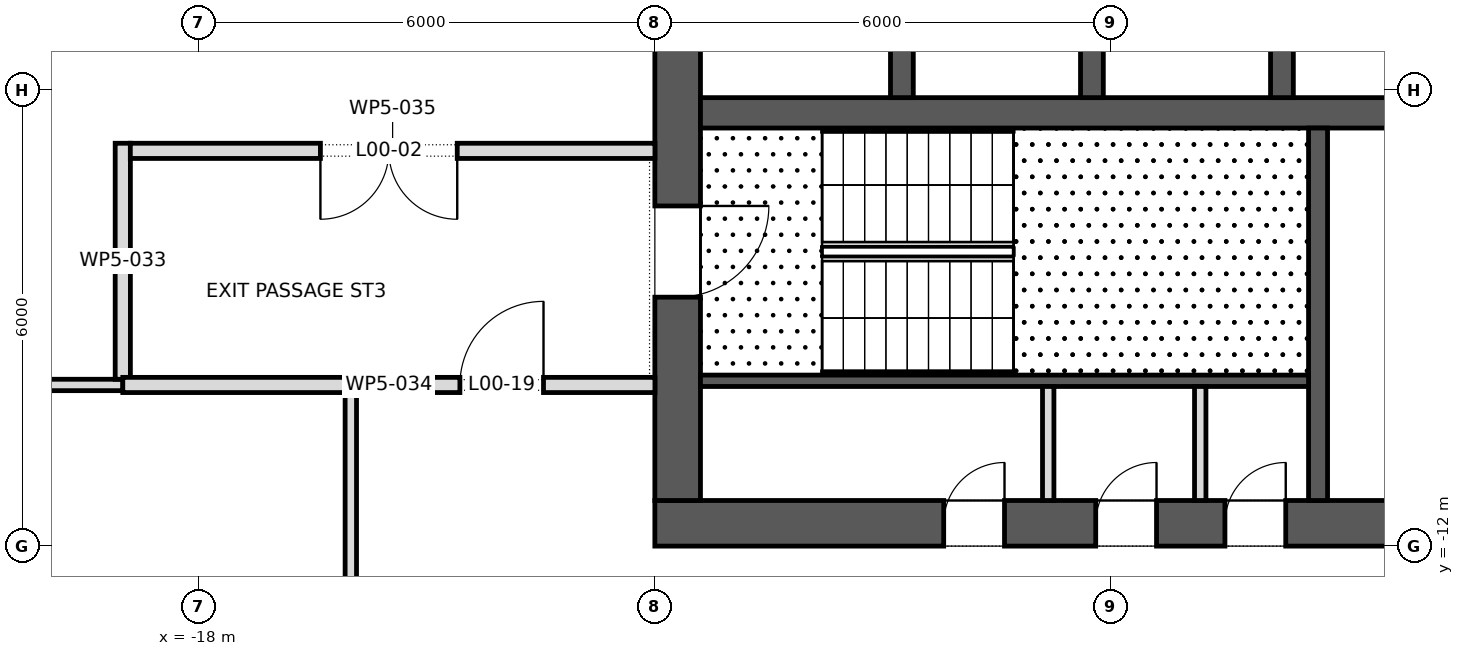
"""IFC4 building model, lengths in metres.
Left out: names, types, materials, properties, quantities, classifications, styles, units other than length and angle.
Written with IfcOpenShell. Run it as: python <this file> out.ifc"""

import sys

from ifc_helpers import new_model, si_unit, direction, frame, frame_2d, origin, place, context, subcontext, project, spatial, polyline, rectangle, outline, extrude, element, fill, save


model = new_model("IFC4")
c1 = context("Model", 3, precision=1e-05, world=origin(), true_north=direction((0.0, 1.0)))
c2 = subcontext(c1, "Body", "Model", "MODEL_VIEW")
j1 = project(units=[si_unit("LENGTHUNIT", "METRE"), si_unit("PLANEANGLEUNIT", "RADIAN")], contexts=[c1])
p1 = place(None, origin())
s1 = spatial("IfcSite", under=j1, at=p1, CompositionType="ELEMENT")
p2 = place(p1, origin())
s2 = spatial("IfcBuilding", under=s1, at=p2, CompositionType="ELEMENT")
p3 = place(p2, origin())
s3 = spatial("IfcBuildingStorey", under=s2, at=p3, CompositionType="ELEMENT", Elevation=0.0)
p4 = place(p3, frame((-12.0, -11.7, 0.0), z_axis=(0.0, 0.0, 1.0), x_axis=(1.0, 0.0, 0.0)))
e1 = element("IfcWall", 1, at=p4, inside=s3, PredefinedType="SHEAR", context=c2, shape_type="SweptSolid", body=[
    extrude(rectangle(XDim=24.0, YDim=0.6, at=frame_2d((12.0, 0.0))), origin(), (0.0, 0.0, 1.0), 7.0),
])
p5 = place(p4, frame((9.975, 0.0, 0.0)))
e2 = element("IfcOpeningElement", 2, at=p5, cuts=e1, PredefinedType="OPENING", context=c2, shape_type="SweptSolid", body=[
    extrude(rectangle(XDim=0.9, YDim=2.1, at=frame_2d((0.45, 1.05))), frame((0.0, 0.312, 0.0), z_axis=(0.0, -1.0, 0.0), x_axis=(1.0, 0.0, 0.0)), (0.0, 0.0, 1.0), 0.624),
])
p6 = place(p4, frame((3.8, 0.0, 0.0)))
e3 = element("IfcOpeningElement", 3, at=p6, cuts=e1, PredefinedType="OPENING", context=c2, shape_type="SweptSolid", body=[
    extrude(rectangle(XDim=0.8, YDim=2.1, at=frame_2d((0.4, 1.05))), frame((0.0, 0.312, 0.0), z_axis=(0.0, -1.0, 0.0), x_axis=(1.0, 0.0, 0.0)), (0.0, 0.0, 1.0), 0.624),
])
p7 = place(p4, frame((5.8, 0.0, 0.0)))
e4 = element("IfcOpeningElement", 4, at=p7, cuts=e1, PredefinedType="OPENING", context=c2, shape_type="SweptSolid", body=[
    extrude(rectangle(XDim=0.8, YDim=2.1, at=frame_2d((0.4, 1.05))), frame((0.0, 0.312, 0.0), z_axis=(0.0, -1.0, 0.0), x_axis=(1.0, 0.0, 0.0)), (0.0, 0.0, 1.0), 0.624),
])
p8 = place(p4, frame((7.5, 0.0, 0.0)))
e5 = element("IfcOpeningElement", 5, at=p8, cuts=e1, PredefinedType="OPENING", context=c2, shape_type="SweptSolid", body=[
    extrude(rectangle(XDim=0.8, YDim=2.1, at=frame_2d((0.4, 1.05))), frame((0.0, 0.312, 0.0), z_axis=(0.0, -1.0, 0.0), x_axis=(1.0, 0.0, 0.0)), (0.0, 0.0, 1.0), 0.624),
])
p9 = place(p4, frame((15.85, 0.0, 0.0)))
e6 = element("IfcOpeningElement", 6, at=p9, cuts=e1, PredefinedType="OPENING", context=c2, shape_type="SweptSolid", body=[
    extrude(rectangle(XDim=0.8, YDim=2.1, at=frame_2d((0.4, 1.05))), frame((0.0, 0.312, 0.0), z_axis=(0.0, -1.0, 0.0), x_axis=(1.0, 0.0, 0.0)), (0.0, 0.0, 1.0), 0.624),
])
p10 = place(p3, frame((-11.7, -11.4, 0.0), z_axis=(0.0, 0.0, 1.0), x_axis=(0.0, 1.0, 0.0)))
e7 = element("IfcWall", 7, at=p10, inside=s3, PredefinedType="SHEAR", context=c2, shape_type="SweptSolid", body=[
    extrude(rectangle(XDim=22.8, YDim=0.6, at=frame_2d((11.4, 0.0))), origin(), (0.0, 0.0, 1.0), 7.0),
])
p11 = place(p10, frame((10.2, 0.0, 0.0)))
e8 = element("IfcOpeningElement", 8, at=p11, cuts=e7, PredefinedType="OPENING", context=c2, shape_type="SweptSolid", body=[
    extrude(rectangle(XDim=2.4, YDim=2.1, at=frame_2d((1.2, 1.05))), frame((0.0, 0.312, 0.0), z_axis=(0.0, -1.0, 0.0), x_axis=(1.0, 0.0, 0.0)), (0.0, 0.0, 1.0), 0.624),
])
p12 = place(p10, frame((18.925, 0.0, 0.0)))
e9 = element("IfcOpeningElement", 9, at=p12, cuts=e7, PredefinedType="OPENING", context=c2, shape_type="SweptSolid", body=[
    extrude(rectangle(XDim=1.2, YDim=2.1, at=frame_2d((0.6, 1.05))), frame((0.0, 0.312, 0.0), z_axis=(0.0, -1.0, 0.0), x_axis=(1.0, 0.0, 0.0)), (0.0, 0.0, 1.0), 0.624),
])
p13 = place(p10, frame((2.675, 0.0, 0.0)))
e10 = element("IfcOpeningElement", 10, at=p13, cuts=e7, PredefinedType="OPENING", context=c2, shape_type="SweptSolid", body=[
    extrude(rectangle(XDim=1.2, YDim=2.1, at=frame_2d((0.6, 1.05))), frame((0.0, 0.312, 0.0), z_axis=(0.0, -1.0, 0.0), x_axis=(1.0, 0.0, 0.0)), (0.0, 0.0, 1.0), 0.624),
])
p14 = place(p3, frame((-11.4, -6.3, 0.0), z_axis=(0.0, 0.0, 1.0), x_axis=(1.0, 0.0, 0.0)))
e11 = element("IfcWall", 11, at=p14, inside=s3, PredefinedType="SHEAR", context=c2, shape_type="SweptSolid", body=[
    extrude(rectangle(XDim=22.8, YDim=0.4, at=frame_2d((11.4, 0.0))), origin(), (0.0, 0.0, 1.0), 7.0),
])
p15 = place(p14, frame((20.85, 0.0, 0.0)))
e12 = element("IfcOpeningElement", 12, at=p15, cuts=e11, PredefinedType="OPENING", context=c2, shape_type="SweptSolid", body=[
    extrude(rectangle(XDim=1.1, YDim=2.1, at=frame_2d((0.55, 1.05))), frame((0.0, 0.212, 0.0), z_axis=(0.0, -1.0, 0.0), x_axis=(1.0, 0.0, 0.0)), (0.0, 0.0, 1.0), 0.424),
])
for number, where, z_axis, x_axis in (
    (13, (-8.75, -6.1, 0.0), (0.0, 0.0, 1.0), (0.0, 1.0, 0.0)),
    (14, (-6.25, -6.1, 0.0), (0.0, 0.0, 1.0), (0.0, 1.0, 0.0)),
    (15, (-3.75, -6.1, 0.0), (0.0, 0.0, 1.0), (0.0, 1.0, 0.0)),
):
    element("IfcWall", number, at=place(p3, frame(where, z_axis=z_axis, x_axis=x_axis)), inside=s3, PredefinedType="SHEAR", context=c2, shape_type="SweptSolid", body=[
        extrude(rectangle(XDim=2.9, YDim=0.3, at=frame_2d((1.45, 0.0))), origin(), (0.0, 0.0, 1.0), 7.0),
    ])
p16 = place(p3, frame((-3.275, -11.4, 0.0), z_axis=(0.0, 0.0, 1.0), x_axis=(0.0, 1.0, 0.0)))
e16 = element("IfcWall", 16, at=p16, inside=s3, PredefinedType="SHEAR", context=c2, shape_type="SweptSolid", body=[
    extrude(rectangle(XDim=4.9, YDim=0.25, at=frame_2d((2.45, 0.0))), origin(), (0.0, 0.0, 1.0), 6.65),
])
p17 = place(p3, frame((-11.4, -9.825, 0.0), z_axis=(0.0, 0.0, 1.0), x_axis=(1.0, 0.0, 0.0)))
e17 = element("IfcWall", 17, at=p17, inside=s3, PredefinedType="SHEAR", context=c2, shape_type="SweptSolid", body=[
    extrude(rectangle(XDim=8.0, YDim=0.15, at=frame_2d((4.0, 0.0))), origin(), (0.0, 0.0, 1.0), 6.65),
])
for number, where, z_axis, x_axis in (
    (18, (-6.825, -11.4, 0.0), (0.0, 0.0, 1.0), (0.0, 1.0, 0.0)),
    (19, (-4.825, -11.4, 0.0), (0.0, 0.0, 1.0), (0.0, 1.0, 0.0)),
):
    element("IfcWall", number, at=place(p3, frame(where, z_axis=z_axis, x_axis=x_axis)), inside=s3, PredefinedType="PARTITIONING", context=c2, shape_type="SweptSolid", body=[
        extrude(rectangle(XDim=1.5, YDim=0.15, at=frame_2d((0.75, 0.0))), origin(), (0.0, 0.0, 1.0), 6.65),
    ])
p18 = place(p3, frame((-18.999, -9.88, 0.0), z_axis=(0.0, 0.0, 1.0), x_axis=(-1.0, 0.0, 0.0)))
e20 = element("IfcWall", 20, at=p18, inside=s3, PredefinedType="PARTITIONING", context=c2, shape_type="SweptSolid", body=[
    extrude(outline(polyline([(0.0, -0.075), (16.668, -0.075), (16.634, 0.075), (0.0, 0.075), (0.0, -0.075)])), origin(), (0.0, 0.0, 1.0), 6.65),
])
p19 = place(p18, frame((7.406, 0.0, 0.0)))
e21 = element("IfcOpeningElement", 21, at=p19, cuts=e20, PredefinedType="OPENING", context=c2, shape_type="SweptSolid", body=[
    extrude(rectangle(XDim=1.8, YDim=2.1, at=frame_2d((0.9, 1.05))), frame((0.0, 0.087, 0.0), z_axis=(0.0, -1.0, 0.0), x_axis=(1.0, 0.0, 0.0)), (0.0, 0.0, 1.0), 0.174),
])
p20 = place(p3, frame((-19.0, -9.805, 0.0), z_axis=(0.0, 0.0, 1.0), x_axis=(0.0, 1.0, 0.0)))
e22 = element("IfcWall", 22, at=p20, inside=s3, PredefinedType="PARTITIONING", context=c2, shape_type="SweptSolid", body=[
    extrude(rectangle(XDim=3.105, YDim=0.2, at=frame_2d((1.553, 0.0))), origin(), (0.0, 0.0, 1.0), 6.65),
])
p21 = place(p3, frame((-19.0, -9.88, 0.0), z_axis=(0.0, 0.0, 1.0), x_axis=(1.0, 0.0, 0.0)))
e23 = element("IfcWall", 23, at=p21, inside=s3, PredefinedType="PARTITIONING", context=c2, shape_type="SweptSolid", body=[
    extrude(rectangle(XDim=7.001, YDim=0.2, at=frame_2d((3.5, 0.0))), origin(), (0.0, 0.0, 1.0), 6.65),
])
p22 = place(p21, frame((4.435, 0.0, 0.0)))
e24 = element("IfcOpeningElement", 24, at=p22, cuts=e23, PredefinedType="OPENING", context=c2, shape_type="SweptSolid", body=[
    extrude(rectangle(XDim=1.1, YDim=2.1, at=frame_2d((0.55, 1.05))), frame((0.0, 0.112, 0.0), z_axis=(0.0, -1.0, 0.0), x_axis=(1.0, 0.0, 0.0)), (0.0, 0.0, 1.0), 0.224),
])
p23 = place(p3, frame((-18.901, -6.8, 0.0), z_axis=(0.0, 0.0, 1.0), x_axis=(1.0, 0.0, 0.0)))
e25 = element("IfcWall", 25, at=p23, inside=s3, PredefinedType="PARTITIONING", context=c2, shape_type="SweptSolid", body=[
    extrude(rectangle(XDim=6.902, YDim=0.2, at=frame_2d((3.451, 0.0))), origin(), (0.0, 0.0, 1.0), 6.65),
])
p24 = place(p23, frame((2.501, 0.0, 0.0)))
e26 = element("IfcOpeningElement", 26, at=p24, cuts=e25, PredefinedType="OPENING", context=c2, shape_type="SweptSolid", body=[
    extrude(rectangle(XDim=1.8, YDim=2.1, at=frame_2d((0.9, 1.05))), frame((0.0, 0.112, 0.0), z_axis=(0.0, -1.0, 0.0), x_axis=(1.0, 0.0, 0.0)), (0.0, 0.0, 1.0), 0.224),
])
p25 = place(p3, frame((-16.0, -24.075, 0.0), z_axis=(0.0, 0.0, 1.0), x_axis=(0.0, 1.0, 0.0)))
e27 = element("IfcWall", 27, at=p25, inside=s3, PredefinedType="PARTITIONING", context=c2, shape_type="SweptSolid", body=[
    extrude(rectangle(XDim=14.095, YDim=0.15, at=frame_2d((7.047, 0.0))), origin(), (0.0, 0.0, 1.0), 6.65),
])
p26 = place(p25, frame((5.935, 0.0, 0.0)))
e28 = element("IfcOpeningElement", 28, at=p26, cuts=e27, PredefinedType="OPENING", context=c2, shape_type="SweptSolid", body=[
    extrude(rectangle(XDim=2.4, YDim=2.1, at=frame_2d((1.2, 1.05))), frame((0.0, 0.087, 0.0), z_axis=(0.0, -1.0, 0.0), x_axis=(1.0, 0.0, 0.0)), (0.0, 0.0, 1.0), 0.174),
])
p27 = place(p13, frame((1.2, 0.0, 0.0), z_axis=(0.0, 0.0, 1.0), x_axis=(-1.0, 0.0, 0.0)))
e29 = element("IfcDoor", 29, at=p27, inside=s3, OperationType="SINGLE_SWING_RIGHT", PredefinedType="DOOR", context=c2, shape_type="SweptSolid", body=[
    extrude(rectangle(XDim=1.2, YDim=2.1, at=frame_2d((0.6, 1.05))), frame((0.0, 0.025, 0.0), z_axis=(0.0, -1.0, 0.0), x_axis=(1.0, 0.0, 0.0)), (0.0, 0.0, 1.0), 0.05),
])
fill(e10, e29)
p28 = place(p6, origin())
e30 = element("IfcDoor", 30, at=p28, inside=s3, OperationType="SINGLE_SWING_LEFT", PredefinedType="DOOR", context=c2, shape_type="SweptSolid", body=[
    extrude(rectangle(XDim=0.8, YDim=2.1, at=frame_2d((0.4, 1.05))), frame((0.0, 0.025, 0.0), z_axis=(0.0, -1.0, 0.0), x_axis=(1.0, 0.0, 0.0)), (0.0, 0.0, 1.0), 0.05),
])
fill(e3, e30)
p29 = place(p7, origin())
e31 = element("IfcDoor", 31, at=p29, inside=s3, OperationType="SINGLE_SWING_LEFT", PredefinedType="DOOR", context=c2, shape_type="SweptSolid", body=[
    extrude(rectangle(XDim=0.8, YDim=2.1, at=frame_2d((0.4, 1.05))), frame((0.0, 0.025, 0.0), z_axis=(0.0, -1.0, 0.0), x_axis=(1.0, 0.0, 0.0)), (0.0, 0.0, 1.0), 0.05),
])
fill(e4, e31)
p30 = place(p8, origin())
e32 = element("IfcDoor", 32, at=p30, inside=s3, OperationType="SINGLE_SWING_LEFT", PredefinedType="DOOR", context=c2, shape_type="SweptSolid", body=[
    extrude(rectangle(XDim=0.8, YDim=2.1, at=frame_2d((0.4, 1.05))), frame((0.0, 0.025, 0.0), z_axis=(0.0, -1.0, 0.0), x_axis=(1.0, 0.0, 0.0)), (0.0, 0.0, 1.0), 0.05),
])
fill(e5, e32)
p31 = place(p24, frame((1.8, 0.0, 0.0), z_axis=(0.0, 0.0, 1.0), x_axis=(-1.0, 0.0, 0.0)))
e33 = element("IfcDoor", 33, at=p31, inside=s3, OperationType="DOUBLE_DOOR_SINGLE_SWING", PredefinedType="DOOR", context=c2, shape_type="SweptSolid", body=[
    extrude(rectangle(XDim=1.8, YDim=2.1, at=frame_2d((0.9, 1.05))), frame((0.0, 0.025, 0.0), z_axis=(0.0, -1.0, 0.0), x_axis=(1.0, 0.0, 0.0)), (0.0, 0.0, 1.0), 0.05),
])
fill(e26, e33)
p32 = place(p22, origin())
e34 = element("IfcDoor", 34, at=p32, inside=s3, OperationType="SINGLE_SWING_LEFT", PredefinedType="DOOR", context=c2, shape_type="SweptSolid", body=[
    extrude(rectangle(XDim=1.1, YDim=2.1, at=frame_2d((0.55, 1.05))), frame((0.0, 0.025, 0.0), z_axis=(0.0, -1.0, 0.0), x_axis=(1.0, 0.0, 0.0)), (0.0, 0.0, 1.0), 0.05),
])
fill(e24, e34)
save(model, sys.argv[1])
